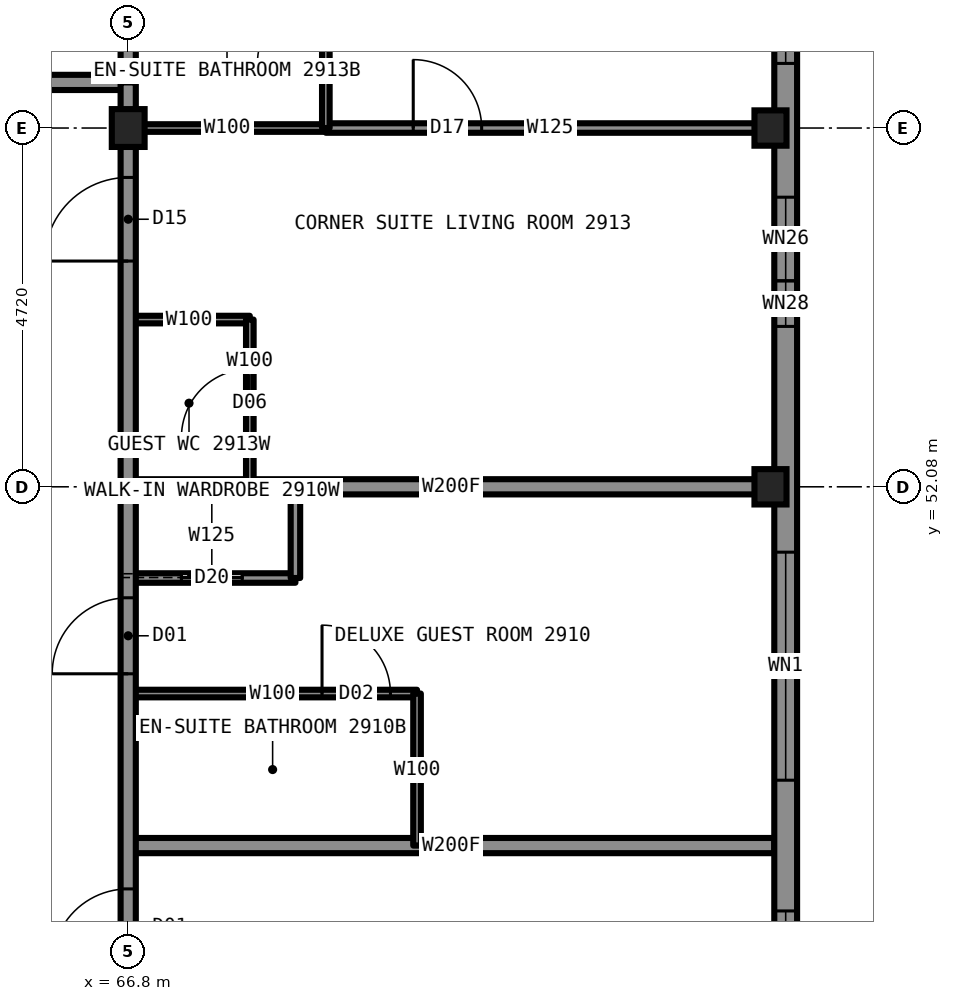
"""IFC4 building model, lengths in metres.
Left out: names, types, materials, properties, quantities, classifications, styles, units other than length and angle.
Written with IfcOpenShell. Run it as: python <this file> out.ifc"""

import sys

from ifc_helpers import new_model, si_unit, direction, frame, frame_2d, origin, origin_2d, place, context, subcontext, project, spatial, rectangle, i_section, extrude, element, fill, save


model = new_model("IFC4")
c1 = context("Model", 3, precision=1e-05, world=origin(), true_north=direction((0.0, 1.0)))
c2 = subcontext(c1, "Body", "Model", "MODEL_VIEW")
j1 = project(units=[si_unit("LENGTHUNIT", "METRE"), si_unit("PLANEANGLEUNIT", "RADIAN")], contexts=[c1])
p1 = place(None, origin())
s1 = spatial("IfcSite", under=j1, at=p1, CompositionType="ELEMENT")
p2 = place(p1, origin())
s2 = spatial("IfcBuilding", under=s1, at=p2, CompositionType="ELEMENT")
p3 = place(p2, frame((0.0, 0.0, 103.9)))
s3 = spatial("IfcBuildingStorey", under=s2, at=p3, CompositionType="ELEMENT", Elevation=103.9)
for number, where, z_axis, x_axis in (
    (1, (75.25, 52.08, 0.0), (0.0, 0.0, 1.0), (1.0, 0.0, 0.0)),
    (2, (75.25, 56.8, 0.0), (0.0, 0.0, 1.0), (1.0, 0.0, 0.0)),
):
    element("IfcColumn", number, at=place(p3, frame(where, z_axis=z_axis, x_axis=x_axis)), inside=s3, PredefinedType="COLUMN", context=c2, shape_type="SweptSolid", body=[
        extrude(i_section(OverallWidth=0.422, OverallDepth=0.465, WebThickness=0.045, FlangeThickness=0.073, at=origin_2d()), origin(), (0.0, 0.0, 1.0), 3.5),
    ])
p4 = place(p3, frame((66.8, 56.8, 0.0), z_axis=(0.0, 0.0, 1.0), x_axis=(1.0, 0.0, 0.0)))
e3 = element("IfcColumn", 3, at=p4, inside=s3, PredefinedType="COLUMN", context=c2, shape_type="SweptSolid", body=[
    extrude(i_section(OverallWidth=0.432, OverallDepth=0.498, WebThickness=0.056, FlangeThickness=0.089, at=origin_2d()), origin(), (0.0, 0.0, 1.0), 3.5),
])
p5 = place(p3, frame((66.8, 56.8, 0.0), z_axis=(0.0, 0.0, 1.0), x_axis=(1.0, 0.0, 0.0)))
e4 = element("IfcWall", 4, at=p5, inside=s3, PredefinedType="PARTITIONING", context=c2, shape_type="SweptSolid", body=[
    extrude(rectangle(XDim=2.6, YDim=0.1, at=frame_2d((1.3, 0.0))), origin(), (0.0, 0.0, 1.0), 2.573),
])
p6 = place(p3, frame((69.4, 56.8, 0.0), z_axis=(0.0, 0.0, 1.0), x_axis=(1.0, 0.0, 0.0)))
e5 = element("IfcWall", 5, at=p6, inside=s3, PredefinedType="PARTITIONING", context=c2, shape_type="SweptSolid", body=[
    extrude(rectangle(XDim=5.9, YDim=0.125, at=frame_2d((2.95, 0.0))), origin(), (0.0, 0.0, 1.0), 2.573),
])
p7 = place(p6, frame((1.15, 0.0, 0.0)))
e6 = element("IfcOpeningElement", 6, at=p7, cuts=e5, PredefinedType="OPENING", context=c2, shape_type="SweptSolid", body=[
    extrude(rectangle(XDim=0.9, YDim=2.2, at=frame_2d((0.45, 1.1))), frame((0.0, 0.073, 0.0), z_axis=(0.0, -1.0, 0.0), x_axis=(1.0, 0.0, 0.0)), (0.0, 0.0, 1.0), 0.145),
])
p8 = place(p3, frame((43.2, 57.4, 0.0), z_axis=(0.0, 0.0, 1.0), x_axis=(1.0, 0.0, 0.0)))
e7 = element("IfcWall", 7, at=p8, inside=s3, PredefinedType="PARTITIONING", context=c2, shape_type="SweptSolid", body=[
    extrude(rectangle(XDim=23.6, YDim=0.2, at=frame_2d((11.8, 0.0))), origin(), (0.0, 0.0, 1.0), 3.33),
])
p9 = place(p8, frame((2.55, 0.0, 0.0)))
e8 = element("IfcOpeningElement", 8, at=p9, cuts=e7, PredefinedType="OPENING", context=c2, shape_type="SweptSolid", body=[
    extrude(rectangle(XDim=1.0, YDim=2.2, at=frame_2d((0.5, 1.1))), frame((0.0, 0.11, 0.0), z_axis=(0.0, -1.0, 0.0), x_axis=(1.0, 0.0, 0.0)), (0.0, 0.0, 1.0), 0.22),
])
p10 = place(p8, frame((7.72, 0.0, 0.0)))
e9 = element("IfcOpeningElement", 9, at=p10, cuts=e7, PredefinedType="OPENING", context=c2, shape_type="SweptSolid", body=[
    extrude(rectangle(XDim=1.0, YDim=2.2, at=frame_2d((0.5, 1.1))), frame((0.0, 0.11, 0.0), z_axis=(0.0, -1.0, 0.0), x_axis=(1.0, 0.0, 0.0)), (0.0, 0.0, 1.0), 0.22),
])
p11 = place(p8, frame((14.56, 0.0, 0.0)))
e10 = element("IfcOpeningElement", 10, at=p11, cuts=e7, PredefinedType="OPENING", context=c2, shape_type="SweptSolid", body=[
    extrude(rectangle(XDim=1.0, YDim=2.2, at=frame_2d((0.5, 1.1))), frame((0.0, 0.11, 0.0), z_axis=(0.0, -1.0, 0.0), x_axis=(1.0, 0.0, 0.0)), (0.0, 0.0, 1.0), 0.22),
])
p12 = place(p8, frame((20.34, 0.0, 0.0)))
e11 = element("IfcOpeningElement", 11, at=p12, cuts=e7, PredefinedType="OPENING", context=c2, shape_type="SweptSolid", body=[
    extrude(rectangle(XDim=1.0, YDim=2.2, at=frame_2d((0.5, 1.1))), frame((0.0, 0.11, 0.0), z_axis=(0.0, -1.0, 0.0), x_axis=(1.0, 0.0, 0.0)), (0.0, 0.0, 1.0), 0.22),
])
p13 = place(p3, frame((66.8, 47.36, 0.0), z_axis=(0.0, 0.0, 1.0), x_axis=(1.0, 0.0, 0.0)))
e12 = element("IfcWall", 12, at=p13, inside=s3, PredefinedType="PARTITIONING", context=c2, shape_type="SweptSolid", body=[
    extrude(rectangle(XDim=8.5, YDim=0.2, at=frame_2d((4.25, 0.0))), origin(), (0.0, 0.0, 1.0), 2.731),
])
p14 = place(p3, frame((66.8, 49.36, 0.0), z_axis=(0.0, 0.0, 1.0), x_axis=(1.0, 0.0, 0.0)))
e13 = element("IfcWall", 13, at=p14, inside=s3, PredefinedType="PARTITIONING", context=c2, shape_type="SweptSolid", body=[
    extrude(rectangle(XDim=3.8, YDim=0.1, at=frame_2d((1.9, 0.0))), origin(), (0.0, 0.0, 1.0), 3.33),
])
p15 = place(p14, frame((2.55, 0.0, 0.0)))
e14 = element("IfcOpeningElement", 14, at=p15, cuts=e13, PredefinedType="OPENING", context=c2, shape_type="SweptSolid", body=[
    extrude(rectangle(XDim=0.9, YDim=2.1, at=frame_2d((0.45, 1.05))), frame((0.0, 0.06, 0.0), z_axis=(0.0, -1.0, 0.0), x_axis=(1.0, 0.0, 0.0)), (0.0, 0.0, 1.0), 0.12),
])
p16 = place(p3, frame((66.8, 50.88, 0.0), z_axis=(0.0, 0.0, 1.0), x_axis=(1.0, 0.0, 0.0)))
e15 = element("IfcWall", 15, at=p16, inside=s3, PredefinedType="PARTITIONING", context=c2, shape_type="SweptSolid", body=[
    extrude(rectangle(XDim=2.2, YDim=0.125, at=frame_2d((1.1, 0.0))), origin(), (0.0, 0.0, 1.0), 3.33),
])
p17 = place(p16, frame((0.7, 0.0, 0.0)))
e16 = element("IfcOpeningElement", 16, at=p17, cuts=e15, PredefinedType="OPENING", context=c2, shape_type="SweptSolid", body=[
    extrude(rectangle(XDim=0.8, YDim=2.1, at=frame_2d((0.4, 1.05))), frame((0.0, 0.073, 0.0), z_axis=(0.0, -1.0, 0.0), x_axis=(1.0, 0.0, 0.0)), (0.0, 0.0, 1.0), 0.145),
])
p18 = place(p3, frame((66.8, 52.08, 0.0), z_axis=(0.0, 0.0, 1.0), x_axis=(1.0, 0.0, 0.0)))
e17 = element("IfcWall", 17, at=p18, inside=s3, PredefinedType="PARTITIONING", context=c2, shape_type="SweptSolid", body=[
    extrude(rectangle(XDim=8.5, YDim=0.2, at=frame_2d((4.25, 0.0))), origin(), (0.0, 0.0, 1.0), 2.573),
])
p19 = place(p3, frame((66.8, 54.28, 0.0), z_axis=(0.0, 0.0, 1.0), x_axis=(1.0, 0.0, 0.0)))
e18 = element("IfcWall", 18, at=p19, inside=s3, PredefinedType="PARTITIONING", context=c2, shape_type="SweptSolid", body=[
    extrude(rectangle(XDim=1.6, YDim=0.1, at=frame_2d((0.8, 0.0))), origin(), (0.0, 0.0, 1.0), 3.33),
])
p20 = place(p3, frame((66.8, 33.2, 0.0), z_axis=(0.0, 0.0, 1.0), x_axis=(0.0, 1.0, 0.0)))
e19 = element("IfcWall", 19, at=p20, inside=s3, PredefinedType="PARTITIONING", context=c2, shape_type="SweptSolid", body=[
    extrude(rectangle(XDim=23.58, YDim=0.2, at=frame_2d((11.79, 0.0))), origin(), (0.0, 0.0, 1.0), 3.33),
])
p21 = place(p20, frame((6.98, 0.0, 0.0)))
e20 = element("IfcOpeningElement", 20, at=p21, cuts=e19, PredefinedType="OPENING", context=c2, shape_type="SweptSolid", body=[
    extrude(rectangle(XDim=1.0, YDim=2.2, at=frame_2d((0.5, 1.1))), frame((0.0, 0.11, 0.0), z_axis=(0.0, -1.0, 0.0), x_axis=(1.0, 0.0, 0.0)), (0.0, 0.0, 1.0), 0.22),
])
p22 = place(p20, frame((12.59, 0.0, 0.0)))
e21 = element("IfcOpeningElement", 21, at=p22, cuts=e19, PredefinedType="OPENING", context=c2, shape_type="SweptSolid", body=[
    extrude(rectangle(XDim=1.0, YDim=2.2, at=frame_2d((0.5, 1.1))), frame((0.0, 0.11, 0.0), z_axis=(0.0, -1.0, 0.0), x_axis=(1.0, 0.0, 0.0)), (0.0, 0.0, 1.0), 0.22),
])
p23 = place(p20, frame((16.42, 0.0, 0.0)))
e22 = element("IfcOpeningElement", 22, at=p23, cuts=e19, PredefinedType="OPENING", context=c2, shape_type="SweptSolid", body=[
    extrude(rectangle(XDim=1.0, YDim=2.2, at=frame_2d((0.5, 1.1))), frame((0.0, 0.11, 0.0), z_axis=(0.0, -1.0, 0.0), x_axis=(1.0, 0.0, 0.0)), (0.0, 0.0, 1.0), 0.22),
])
p24 = place(p20, frame((21.85, 0.0, 0.0)))
e23 = element("IfcOpeningElement", 23, at=p24, cuts=e19, PredefinedType="OPENING", context=c2, shape_type="SweptSolid", body=[
    extrude(rectangle(XDim=1.1, YDim=2.2, at=frame_2d((0.55, 1.1))), frame((0.0, 0.11, 0.0), z_axis=(0.0, -1.0, 0.0), x_axis=(1.0, 0.0, 0.0)), (0.0, 0.0, 1.0), 0.22),
])
p25 = place(p20, frame((0.65, 0.0, 0.0)))
e24 = element("IfcOpeningElement", 24, at=p25, cuts=e19, PredefinedType="OPENING", context=c2, shape_type="SweptSolid", body=[
    extrude(rectangle(XDim=1.1, YDim=2.2, at=frame_2d((0.55, 1.1))), frame((0.0, 0.11, 0.0), z_axis=(0.0, -1.0, 0.0), x_axis=(1.0, 0.0, 0.0)), (0.0, 0.0, 1.0), 0.22),
])
p26 = place(p3, frame((66.8, 57.4, 0.0), z_axis=(0.0, 0.0, 1.0), x_axis=(0.0, 1.0, 0.0)))
e25 = element("IfcWall", 25, at=p26, inside=s3, PredefinedType="PARTITIONING", context=c2, shape_type="SweptSolid", body=[
    extrude(rectangle(XDim=7.9, YDim=0.2, at=frame_2d((3.95, 0.0))), origin(), (0.0, 0.0, 1.0), 2.573),
])
p27 = place(p3, frame((68.4, 52.08, 0.0), z_axis=(0.0, 0.0, 1.0), x_axis=(0.0, 1.0, 0.0)))
e26 = element("IfcWall", 26, at=p27, inside=s3, PredefinedType="PARTITIONING", context=c2, shape_type="SweptSolid", body=[
    extrude(rectangle(XDim=2.2, YDim=0.1, at=frame_2d((1.1, 0.0))), origin(), (0.0, 0.0, 1.0), 3.33),
])
p28 = place(p27, frame((0.65, 0.0, 0.0)))
e27 = element("IfcOpeningElement", 27, at=p28, cuts=e26, PredefinedType="OPENING", context=c2, shape_type="SweptSolid", body=[
    extrude(rectangle(XDim=0.9, YDim=2.1, at=frame_2d((0.45, 1.05))), frame((0.0, 0.06, 0.0), z_axis=(0.0, -1.0, 0.0), x_axis=(1.0, 0.0, 0.0)), (0.0, 0.0, 1.0), 0.12),
])
p29 = place(p3, frame((69.0, 50.88, 0.0), z_axis=(0.0, 0.0, 1.0), x_axis=(0.0, 1.0, 0.0)))
e28 = element("IfcWall", 28, at=p29, inside=s3, PredefinedType="PARTITIONING", context=c2, shape_type="SweptSolid", body=[
    extrude(rectangle(XDim=1.2, YDim=0.125, at=frame_2d((0.6, 0.0))), origin(), (0.0, 0.0, 1.0), 3.33),
])
p30 = place(p3, frame((69.4, 56.8, 0.0), z_axis=(0.0, 0.0, 1.0), x_axis=(0.0, 1.0, 0.0)))
e29 = element("IfcWall", 29, at=p30, inside=s3, PredefinedType="PARTITIONING", context=c2, shape_type="SweptSolid", body=[
    extrude(rectangle(XDim=2.6, YDim=0.1, at=frame_2d((1.3, 0.0))), origin(), (0.0, 0.0, 1.0), 3.33),
])
p31 = place(p30, frame((0.85, 0.0, 0.0)))
e30 = element("IfcOpeningElement", 30, at=p31, cuts=e29, PredefinedType="OPENING", context=c2, shape_type="SweptSolid", body=[
    extrude(rectangle(XDim=0.9, YDim=2.1, at=frame_2d((0.45, 1.05))), frame((0.0, 0.06, 0.0), z_axis=(0.0, -1.0, 0.0), x_axis=(1.0, 0.0, 0.0)), (0.0, 0.0, 1.0), 0.12),
])
p32 = place(p3, frame((70.6, 47.36, 0.0), z_axis=(0.0, 0.0, 1.0), x_axis=(0.0, 1.0, 0.0)))
e31 = element("IfcWall", 31, at=p32, inside=s3, PredefinedType="PARTITIONING", context=c2, shape_type="SweptSolid", body=[
    extrude(rectangle(XDim=2.0, YDim=0.1, at=frame_2d((1.0, 0.0))), origin(), (0.0, 0.0, 1.0), 3.33),
])
p33 = place(p3, frame((75.45, 29.9, 0.0), z_axis=(0.0, 0.0, 1.0), x_axis=(0.0, 1.0, 0.0)))
e32 = element("IfcWall", 32, at=p33, inside=s3, PredefinedType="SOLIDWALL", context=c2, shape_type="SweptSolid", body=[
    extrude(rectangle(XDim=30.2, YDim=0.3, at=frame_2d((15.1, 0.0))), origin(), (0.0, 0.0, 1.0), 2.83),
])
p34 = place(p33, frame((4.16, 0.0, 0.5)))
e33 = element("IfcOpeningElement", 33, at=p34, cuts=e32, PredefinedType="OPENING", context=c2, shape_type="SweptSolid", body=[
    extrude(rectangle(XDim=3.0, YDim=2.0, at=frame_2d((1.5, 1.0))), frame((0.0, 0.16, 0.0), z_axis=(0.0, -1.0, 0.0), x_axis=(1.0, 0.0, 0.0)), (0.0, 0.0, 1.0), 0.32),
])
p35 = place(p33, frame((8.88, 0.0, 0.5)))
e34 = element("IfcOpeningElement", 34, at=p35, cuts=e32, PredefinedType="OPENING", context=c2, shape_type="SweptSolid", body=[
    extrude(rectangle(XDim=3.0, YDim=2.0, at=frame_2d((1.5, 1.0))), frame((0.0, 0.16, 0.0), z_axis=(0.0, -1.0, 0.0), x_axis=(1.0, 0.0, 0.0)), (0.0, 0.0, 1.0), 0.32),
])
p36 = place(p33, frame((13.6, 0.0, 0.5)))
e35 = element("IfcOpeningElement", 35, at=p36, cuts=e32, PredefinedType="OPENING", context=c2, shape_type="SweptSolid", body=[
    extrude(rectangle(XDim=3.0, YDim=2.0, at=frame_2d((1.5, 1.0))), frame((0.0, 0.16, 0.0), z_axis=(0.0, -1.0, 0.0), x_axis=(1.0, 0.0, 0.0)), (0.0, 0.0, 1.0), 0.32),
])
p37 = place(p33, frame((18.32, 0.0, 0.5)))
e36 = element("IfcOpeningElement", 36, at=p37, cuts=e32, PredefinedType="OPENING", context=c2, shape_type="SweptSolid", body=[
    extrude(rectangle(XDim=3.0, YDim=2.0, at=frame_2d((1.5, 1.0))), frame((0.0, 0.16, 0.0), z_axis=(0.0, -1.0, 0.0), x_axis=(1.0, 0.0, 0.0)), (0.0, 0.0, 1.0), 0.32),
])
p38 = place(p33, frame((23.04, 0.0, 0.5)))
e37 = element("IfcOpeningElement", 37, at=p38, cuts=e32, PredefinedType="OPENING", context=c2, shape_type="SweptSolid", body=[
    extrude(rectangle(XDim=3.0, YDim=2.0, at=frame_2d((1.5, 1.0))), frame((0.0, 0.16, 0.0), z_axis=(0.0, -1.0, 0.0), x_axis=(1.0, 0.0, 0.0)), (0.0, 0.0, 1.0), 0.32),
])
p39 = place(p3, frame((66.8, 56.78, 0.0), z_axis=(0.0, 0.0, 1.0), x_axis=(0.0, 1.0, 0.0)))
e38 = element("IfcWall", 38, at=p39, inside=s3, PredefinedType="PARTITIONING", context=c2, shape_type="SweptSolid", body=[
    extrude(rectangle(XDim=0.62, YDim=0.2, at=frame_2d((0.31, 0.0))), origin(), (0.0, 0.0, 1.0), 2.573),
])
p40 = place(p22, origin())
e39 = element("IfcDoor", 39, at=p40, inside=s3, OperationType="SINGLE_SWING_LEFT", PredefinedType="DOOR", context=c2, shape_type="SweptSolid", body=[
    extrude(rectangle(XDim=1.0, YDim=2.2, at=frame_2d((0.5, 1.1))), frame((0.0, 0.025, 0.0), z_axis=(0.0, -1.0, 0.0), x_axis=(1.0, 0.0, 0.0)), (0.0, 0.0, 1.0), 0.05),
])
fill(e21, e39)
p41 = place(p23, origin())
e40 = element("IfcDoor", 40, at=p41, inside=s3, OperationType="SINGLE_SWING_LEFT", PredefinedType="DOOR", context=c2, shape_type="SweptSolid", body=[
    extrude(rectangle(XDim=1.0, YDim=2.2, at=frame_2d((0.5, 1.1))), frame((0.0, 0.025, 0.0), z_axis=(0.0, -1.0, 0.0), x_axis=(1.0, 0.0, 0.0)), (0.0, 0.0, 1.0), 0.05),
])
fill(e22, e40)
p42 = place(p15, origin())
e41 = element("IfcDoor", 41, at=p42, inside=s3, OperationType="SINGLE_SWING_RIGHT", PredefinedType="DOOR", context=c2, shape_type="SweptSolid", body=[
    extrude(rectangle(XDim=0.9, YDim=2.1, at=frame_2d((0.45, 1.05))), frame((0.0, 0.025, 0.0), z_axis=(0.0, -1.0, 0.0), x_axis=(1.0, 0.0, 0.0)), (0.0, 0.0, 1.0), 0.05),
])
fill(e14, e41)
p43 = place(p17, origin())
e42 = element("IfcDoor", 42, at=p43, inside=s3, OperationType="SLIDING_TO_LEFT", PredefinedType="DOOR", context=c2, shape_type="SweptSolid", body=[
    extrude(rectangle(XDim=0.8, YDim=2.1, at=frame_2d((0.4, 1.05))), frame((0.0, 0.025, 0.0), z_axis=(0.0, -1.0, 0.0), x_axis=(1.0, 0.0, 0.0)), (0.0, 0.0, 1.0), 0.05),
])
fill(e16, e42)
p44 = place(p24, origin())
e43 = element("IfcDoor", 43, at=p44, inside=s3, OperationType="SINGLE_SWING_LEFT", PredefinedType="DOOR", context=c2, shape_type="SweptSolid", body=[
    extrude(rectangle(XDim=1.1, YDim=2.2, at=frame_2d((0.55, 1.1))), frame((0.0, 0.025, 0.0), z_axis=(0.0, -1.0, 0.0), x_axis=(1.0, 0.0, 0.0)), (0.0, 0.0, 1.0), 0.05),
])
fill(e23, e43)
p45 = place(p31, origin())
e44 = element("IfcDoor", 44, at=p45, inside=s3, OperationType="SINGLE_SWING_RIGHT", PredefinedType="DOOR", context=c2, shape_type="SweptSolid", body=[
    extrude(rectangle(XDim=0.9, YDim=2.1, at=frame_2d((0.45, 1.05))), frame((0.0, 0.025, 0.0), z_axis=(0.0, -1.0, 0.0), x_axis=(1.0, 0.0, 0.0)), (0.0, 0.0, 1.0), 0.05),
])
fill(e30, e44)
p46 = place(p7, origin())
e45 = element("IfcDoor", 45, at=p46, inside=s3, OperationType="SINGLE_SWING_LEFT", PredefinedType="DOOR", context=c2, shape_type="SweptSolid", body=[
    extrude(rectangle(XDim=0.9, YDim=2.2, at=frame_2d((0.45, 1.1))), frame((0.0, 0.025, 0.0), z_axis=(0.0, -1.0, 0.0), x_axis=(1.0, 0.0, 0.0)), (0.0, 0.0, 1.0), 0.05),
])
fill(e6, e45)
p47 = place(p28, origin())
e46 = element("IfcDoor", 46, at=p47, inside=s3, OperationType="SINGLE_SWING_LEFT", PredefinedType="DOOR", context=c2, shape_type="SweptSolid", body=[
    extrude(rectangle(XDim=0.9, YDim=2.1, at=frame_2d((0.45, 1.05))), frame((0.0, 0.025, 0.0), z_axis=(0.0, -1.0, 0.0), x_axis=(1.0, 0.0, 0.0)), (0.0, 0.0, 1.0), 0.05),
])
fill(e27, e46)
p48 = place(p36, origin())
e47 = element("IfcWindow", 47, at=p48, inside=s3, PartitioningType="SINGLE_PANEL", PredefinedType="WINDOW", context=c2, shape_type="SweptSolid", body=[
    extrude(rectangle(XDim=3.0, YDim=2.0, at=frame_2d((1.5, 1.0))), frame((0.0, 0.03, 0.0), z_axis=(0.0, -1.0, 0.0), x_axis=(1.0, 0.0, 0.0)), (0.0, 0.0, 1.0), 0.06),
])
fill(e35, e47)
p49 = place(p37, origin())
e48 = element("IfcWindow", 48, at=p49, inside=s3, PartitioningType="SINGLE_PANEL", PredefinedType="WINDOW", context=c2, shape_type="SweptSolid", body=[
    extrude(rectangle(XDim=3.0, YDim=2.0, at=frame_2d((1.5, 1.0))), frame((0.0, 0.03, 0.0), z_axis=(0.0, -1.0, 0.0), x_axis=(1.0, 0.0, 0.0)), (0.0, 0.0, 1.0), 0.06),
])
fill(e36, e48)
p50 = place(p38, origin())
e49 = element("IfcWindow", 49, at=p50, inside=s3, PartitioningType="SINGLE_PANEL", PredefinedType="WINDOW", context=c2, shape_type="SweptSolid", body=[
    extrude(rectangle(XDim=3.0, YDim=2.0, at=frame_2d((1.5, 1.0))), frame((0.0, 0.03, 0.0), z_axis=(0.0, -1.0, 0.0), x_axis=(1.0, 0.0, 0.0)), (0.0, 0.0, 1.0), 0.06),
])
fill(e37, e49)
save(model, sys.argv[1])
